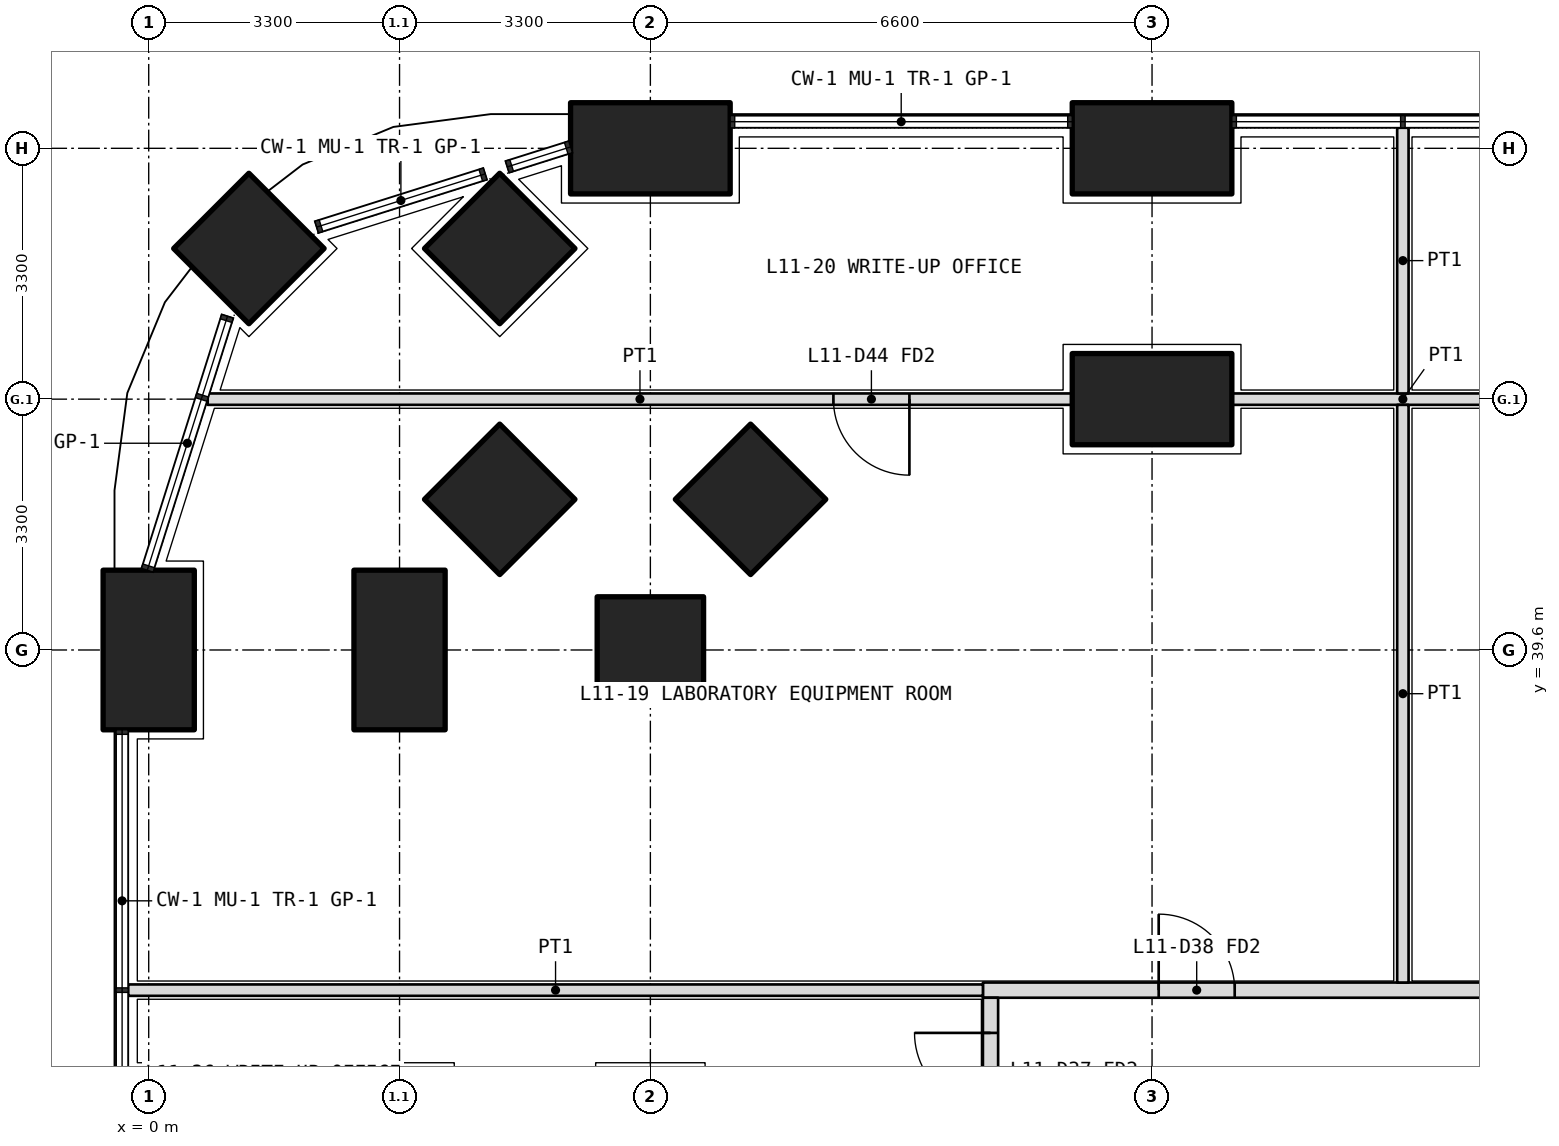
"""IFC4 building model, lengths in metres.
Left out: names, types, materials, properties, quantities, classifications, styles, units other than length and angle.
Written with IfcOpenShell. Run it as: python <this file> out.ifc"""

import sys

from ifc_helpers import new_model, si_unit, direction, frame, frame_2d, origin, origin_2d, place, context, subcontext, project, spatial, rectangle, extrude, element, fill, save


model = new_model("IFC4")
c1 = context("Model", 3, precision=1e-05, world=origin(), true_north=direction((0.0, 1.0)))
c2 = subcontext(c1, "Body", "Model", "MODEL_VIEW")
j1 = project(units=[si_unit("LENGTHUNIT", "METRE"), si_unit("PLANEANGLEUNIT", "RADIAN")], contexts=[c1])
p1 = place(None, origin())
s1 = spatial("IfcSite", under=j1, at=p1, CompositionType="ELEMENT")
p2 = place(p1, origin())
s2 = spatial("IfcBuilding", under=s1, at=p2, CompositionType="ELEMENT")
p3 = place(p2, frame((0.0, 0.0, 50.7)))
s3 = spatial("IfcBuildingStorey", under=s2, at=p3, CompositionType="ELEMENT", Elevation=50.7)
p4 = place(p3, frame((1.318, 44.882, 0.0), z_axis=(0.0, 0.0, 1.0), x_axis=(0.707106781187, 0.707106781187, 0.0)))
e1 = element("IfcColumn", 1, at=p4, inside=s3, PredefinedType="COLUMN", context=c2, shape_type="SweptSolid", body=[
    extrude(rectangle(XDim=1.4, YDim=1.4, at=origin_2d()), origin(), (0.0, 0.0, 1.0), 4.2),
])
for number, where, z_axis, x_axis in (
    (2, (0.0, 39.6, 0.0), (0.0, 0.0, 1.0), (0.0, 1.0, 0.0)),
    (3, (6.6, 46.2, 0.0), (0.0, 0.0, 1.0), (1.0, 0.0, 0.0)),
    (4, (13.2, 46.2, 0.0), (0.0, 0.0, 1.0), (1.0, 0.0, 0.0)),
):
    element("IfcColumn", number, at=place(p3, frame(where, z_axis=z_axis, x_axis=x_axis)), inside=s3, PredefinedType="COLUMN", context=c2, shape_type="SweptSolid", body=[
        extrude(rectangle(XDim=2.1, YDim=1.2, at=origin_2d()), origin(), (0.0, 0.0, 1.0), 4.2),
    ])
for number, where, z_axis, x_axis in (
    (5, (6.6, 39.6, 0.0), (0.0, 0.0, 1.0), (1.0, 0.0, 0.0)),
    (6, (4.618, 44.882, 0.0), (0.0, 0.0, 1.0), (0.707, 0.707, 0.0)),
):
    element("IfcColumn", number, at=place(p3, frame(where, z_axis=z_axis, x_axis=x_axis)), inside=s3, PredefinedType="COLUMN", context=c2, shape_type="SweptSolid", body=[
        extrude(rectangle(XDim=1.4, YDim=1.4, at=origin_2d()), origin(), (0.0, 0.0, 1.0), 4.2),
    ])
p5 = place(p3, frame((3.3, 39.6, 0.0), z_axis=(0.0, 0.0, 1.0), x_axis=(0.0, 1.0, 0.0)))
e7 = element("IfcColumn", 7, at=p5, inside=s3, PredefinedType="COLUMN", context=c2, shape_type="SweptSolid", body=[
    extrude(rectangle(XDim=2.1, YDim=1.2, at=origin_2d()), origin(), (0.0, 0.0, 1.0), 4.2),
])
p6 = place(p3, frame((4.618, 41.582, 0.0), z_axis=(0.0, 0.0, 1.0), x_axis=(0.707106781187, 0.707106781187, 0.0)))
e8 = element("IfcColumn", 8, at=p6, inside=s3, PredefinedType="COLUMN", context=c2, shape_type="SweptSolid", body=[
    extrude(rectangle(XDim=1.4, YDim=1.4, at=origin_2d()), origin(), (0.0, 0.0, 1.0), 4.2),
])
p7 = place(p3, frame((13.2, 42.9, 0.0), z_axis=(0.0, 0.0, 1.0), x_axis=(1.0, 0.0, 0.0)))
e9 = element("IfcColumn", 9, at=p7, inside=s3, PredefinedType="COLUMN", context=c2, shape_type="SweptSolid", body=[
    extrude(rectangle(XDim=2.1, YDim=1.2, at=origin_2d()), origin(), (0.0, 0.0, 1.0), 4.2),
])
p8 = place(p3, frame((7.918, 41.582, 0.0), z_axis=(0.0, 0.0, 1.0), x_axis=(0.707106781187, 0.707106781187, 0.0)))
e10 = element("IfcColumn", 10, at=p8, inside=s3, PredefinedType="COLUMN", context=c2, shape_type="SweptSolid", body=[
    extrude(rectangle(XDim=1.4, YDim=1.4, at=origin_2d()), origin(), (0.0, 0.0, 1.0), 4.2),
])
p9 = place(p3, frame((10.975, 35.125, 0.0), z_axis=(0.0, 0.0, 1.0), x_axis=(1.0, 0.0, 0.0)))
e11 = element("IfcWall", 11, at=p9, inside=s3, PredefinedType="PARTITIONING", context=c2, shape_type="SweptSolid", body=[
    extrude(rectangle(XDim=30.85, YDim=0.2, at=frame_2d((15.425, 0.0))), origin(), (0.0, 0.0, 1.0), 2.85),
])
p10 = place(p9, frame((2.312, 0.0, 0.0)))
e12 = element("IfcOpeningElement", 12, at=p10, cuts=e11, PredefinedType="OPENING", context=c2, shape_type="SweptSolid", body=[
    extrude(rectangle(XDim=1.0, YDim=2.1, at=frame_2d((0.5, 1.05))), frame((0.0, 0.11, 0.0), z_axis=(0.0, -1.0, 0.0), x_axis=(1.0, 0.0, 0.0)), (0.0, 0.0, 1.0), 0.22),
])
p11 = place(p9, frame((11.625, 0.0, 0.0)))
e13 = element("IfcOpeningElement", 13, at=p11, cuts=e11, PredefinedType="OPENING", context=c2, shape_type="SweptSolid", body=[
    extrude(rectangle(XDim=1.0, YDim=2.1, at=frame_2d((0.5, 1.05))), frame((0.0, 0.11, 0.0), z_axis=(0.0, -1.0, 0.0), x_axis=(1.0, 0.0, 0.0)), (0.0, 0.0, 1.0), 0.22),
])
p12 = place(p9, frame((21.525, 0.0, 0.0)))
e14 = element("IfcOpeningElement", 14, at=p12, cuts=e11, PredefinedType="OPENING", context=c2, shape_type="SweptSolid", body=[
    extrude(rectangle(XDim=1.0, YDim=2.1, at=frame_2d((0.5, 1.05))), frame((0.0, 0.11, 0.0), z_axis=(0.0, -1.0, 0.0), x_axis=(1.0, 0.0, 0.0)), (0.0, 0.0, 1.0), 0.22),
])
p13 = place(p9, frame((26.475, 0.0, 0.0)))
e15 = element("IfcOpeningElement", 15, at=p13, cuts=e11, PredefinedType="OPENING", context=c2, shape_type="SweptSolid", body=[
    extrude(rectangle(XDim=1.0, YDim=2.1, at=frame_2d((0.5, 1.05))), frame((0.0, 0.11, 0.0), z_axis=(0.0, -1.0, 0.0), x_axis=(1.0, 0.0, 0.0)), (0.0, 0.0, 1.0), 0.22),
])
p14 = place(p9, frame((29.188, 0.0, 0.0)))
e16 = element("IfcOpeningElement", 16, at=p14, cuts=e11, PredefinedType="OPENING", context=c2, shape_type="SweptSolid", body=[
    extrude(rectangle(XDim=1.0, YDim=2.1, at=frame_2d((0.5, 1.05))), frame((0.0, 0.11, 0.0), z_axis=(0.0, -1.0, 0.0), x_axis=(1.0, 0.0, 0.0)), (0.0, 0.0, 1.0), 0.22),
])
p15 = place(p3, frame((11.075, 11.175, 0.0), z_axis=(0.0, 0.0, 1.0), x_axis=(0.0, 1.0, 0.0)))
e17 = element("IfcWall", 17, at=p15, inside=s3, PredefinedType="PARTITIONING", context=c2, shape_type="SweptSolid", body=[
    extrude(rectangle(XDim=23.85, YDim=0.2, at=frame_2d((11.925, 0.0))), origin(), (0.0, 0.0, 1.0), 2.85),
])
p16 = place(p15, frame((0.462, 0.0, 0.0)))
e18 = element("IfcOpeningElement", 18, at=p16, cuts=e17, PredefinedType="OPENING", context=c2, shape_type="SweptSolid", body=[
    extrude(rectangle(XDim=1.0, YDim=2.1, at=frame_2d((0.5, 1.05))), frame((0.0, 0.11, 0.0), z_axis=(0.0, -1.0, 0.0), x_axis=(1.0, 0.0, 0.0)), (0.0, 0.0, 1.0), 0.22),
])
p17 = place(p15, frame((2.575, 0.0, 0.0)))
e19 = element("IfcOpeningElement", 19, at=p17, cuts=e17, PredefinedType="OPENING", context=c2, shape_type="SweptSolid", body=[
    extrude(rectangle(XDim=1.0, YDim=2.1, at=frame_2d((0.5, 1.05))), frame((0.0, 0.11, 0.0), z_axis=(0.0, -1.0, 0.0), x_axis=(1.0, 0.0, 0.0)), (0.0, 0.0, 1.0), 0.22),
])
p18 = place(p15, frame((5.65, 0.0, 0.0)))
e20 = element("IfcOpeningElement", 20, at=p18, cuts=e17, PredefinedType="OPENING", context=c2, shape_type="SweptSolid", body=[
    extrude(rectangle(XDim=0.9, YDim=2.1, at=frame_2d((0.45, 1.05))), frame((0.0, 0.11, 0.0), z_axis=(0.0, -1.0, 0.0), x_axis=(1.0, 0.0, 0.0)), (0.0, 0.0, 1.0), 0.22),
])
p19 = place(p15, frame((9.5, 0.0, 0.0)))
e21 = element("IfcOpeningElement", 21, at=p19, cuts=e17, PredefinedType="OPENING", context=c2, shape_type="SweptSolid", body=[
    extrude(rectangle(XDim=0.9, YDim=2.1, at=frame_2d((0.45, 1.05))), frame((0.0, 0.11, 0.0), z_axis=(0.0, -1.0, 0.0), x_axis=(1.0, 0.0, 0.0)), (0.0, 0.0, 1.0), 0.22),
])
p20 = place(p15, frame((13.025, 0.0, 0.0)))
e22 = element("IfcOpeningElement", 22, at=p20, cuts=e17, PredefinedType="OPENING", context=c2, shape_type="SweptSolid", body=[
    extrude(rectangle(XDim=1.0, YDim=2.1, at=frame_2d((0.5, 1.05))), frame((0.0, 0.11, 0.0), z_axis=(0.0, -1.0, 0.0), x_axis=(1.0, 0.0, 0.0)), (0.0, 0.0, 1.0), 0.22),
])
p21 = place(p15, frame((18.025, 0.0, 0.0)))
e23 = element("IfcOpeningElement", 23, at=p21, cuts=e17, PredefinedType="OPENING", context=c2, shape_type="SweptSolid", body=[
    extrude(rectangle(XDim=1.0, YDim=2.1, at=frame_2d((0.5, 1.05))), frame((0.0, 0.11, 0.0), z_axis=(0.0, -1.0, 0.0), x_axis=(1.0, 0.0, 0.0)), (0.0, 0.0, 1.0), 0.22),
])
p22 = place(p15, frame((22.387, 0.0, 0.0)))
e24 = element("IfcOpeningElement", 24, at=p22, cuts=e17, PredefinedType="OPENING", context=c2, shape_type="SweptSolid", body=[
    extrude(rectangle(XDim=1.0, YDim=2.1, at=frame_2d((0.5, 1.05))), frame((0.0, 0.11, 0.0), z_axis=(0.0, -1.0, 0.0), x_axis=(1.0, 0.0, 0.0)), (0.0, 0.0, 1.0), 0.22),
])
p23 = place(p3, frame((-0.27, 35.125, 0.0), z_axis=(0.0, 0.0, 1.0), x_axis=(1.0, 0.0, 0.0)))
e25 = element("IfcWall", 25, at=p23, inside=s3, PredefinedType="PARTITIONING", context=c2, shape_type="SweptSolid", body=[
    extrude(rectangle(XDim=11.245, YDim=0.15, at=frame_2d((5.623, 0.0))), origin(), (0.0, 0.0, 1.0), 2.7),
])
p24 = place(p3, frame((18.75, 42.9, 0.0), z_axis=(0.0, 0.0, 1.0), x_axis=(-1.0, 0.0, 0.0)))
e26 = element("IfcWall", 26, at=p24, inside=s3, PredefinedType="PARTITIONING", context=c2, shape_type="SweptSolid", body=[
    extrude(rectangle(XDim=4.5, YDim=0.15, at=frame_2d((2.25, 0.0))), origin(), (0.0, 0.0, 1.0), 3.9),
])
p25 = place(p3, frame((12.15, 42.9, 0.0), z_axis=(0.0, 0.0, 1.0), x_axis=(-1.0, 0.0, 0.0)))
e27 = element("IfcWall", 27, at=p25, inside=s3, PredefinedType="PARTITIONING", context=c2, shape_type="SweptSolid", body=[
    extrude(rectangle(XDim=11.374, YDim=0.15, at=frame_2d((5.687, 0.0))), origin(), (0.0, 0.0, 1.0), 2.7),
])
p26 = place(p25, frame((2.142, 0.0, 0.0)))
e28 = element("IfcOpeningElement", 28, at=p26, cuts=e27, PredefinedType="OPENING", context=c2, shape_type="SweptSolid", body=[
    extrude(rectangle(XDim=1.0, YDim=2.1, at=frame_2d((0.5, 1.05))), frame((0.0, 0.085, 0.0), z_axis=(0.0, -1.0, 0.0), x_axis=(1.0, 0.0, 0.0)), (0.0, 0.0, 1.0), 0.17),
])
p27 = place(p3, frame((16.5, 46.47, 0.0), z_axis=(0.0, 0.0, 1.0), x_axis=(0.0, -1.0, 0.0)))
e29 = element("IfcWall", 29, at=p27, inside=s3, PredefinedType="PARTITIONING", context=c2, shape_type="SweptSolid", body=[
    extrude(rectangle(XDim=3.495, YDim=0.15, at=frame_2d((1.748, 0.0))), origin(), (0.0, 0.0, 1.0), 2.7),
])
p28 = place(p3, frame((16.5, 42.825, 0.0), z_axis=(0.0, 0.0, 1.0), x_axis=(0.0, -1.0, 0.0)))
e30 = element("IfcWall", 30, at=p28, inside=s3, PredefinedType="PARTITIONING", context=c2, shape_type="SweptSolid", body=[
    extrude(rectangle(XDim=7.6, YDim=0.15, at=frame_2d((3.8, 0.0))), origin(), (0.0, 0.0, 1.0), 3.9),
])
p29 = place(p10, origin())
e31 = element("IfcDoor", 31, at=p29, inside=s3, OperationType="SINGLE_SWING_LEFT", PredefinedType="DOOR", context=c2, shape_type="SweptSolid", body=[
    extrude(rectangle(XDim=1.0, YDim=2.1, at=frame_2d((0.5, 1.05))), frame((0.0, 0.025, 0.0), z_axis=(0.0, -1.0, 0.0), x_axis=(1.0, 0.0, 0.0)), (0.0, 0.0, 1.0), 0.05),
])
fill(e12, e31)
p30 = place(p26, origin())
e32 = element("IfcDoor", 32, at=p30, inside=s3, OperationType="SINGLE_SWING_LEFT", PredefinedType="DOOR", context=c2, shape_type="SweptSolid", body=[
    extrude(rectangle(XDim=1.0, YDim=2.1, at=frame_2d((0.5, 1.05))), frame((0.0, 0.025, 0.0), z_axis=(0.0, -1.0, 0.0), x_axis=(1.0, 0.0, 0.0)), (0.0, 0.0, 1.0), 0.05),
])
fill(e28, e32)
p31 = place(p22, origin())
e33 = element("IfcDoor", 33, at=p31, inside=s3, OperationType="SINGLE_SWING_RIGHT", PredefinedType="DOOR", context=c2, shape_type="SweptSolid", body=[
    extrude(rectangle(XDim=1.0, YDim=2.1, at=frame_2d((0.5, 1.05))), frame((0.0, 0.025, 0.0), z_axis=(0.0, -1.0, 0.0), x_axis=(1.0, 0.0, 0.0)), (0.0, 0.0, 1.0), 0.05),
])
fill(e24, e33)
save(model, sys.argv[1])
